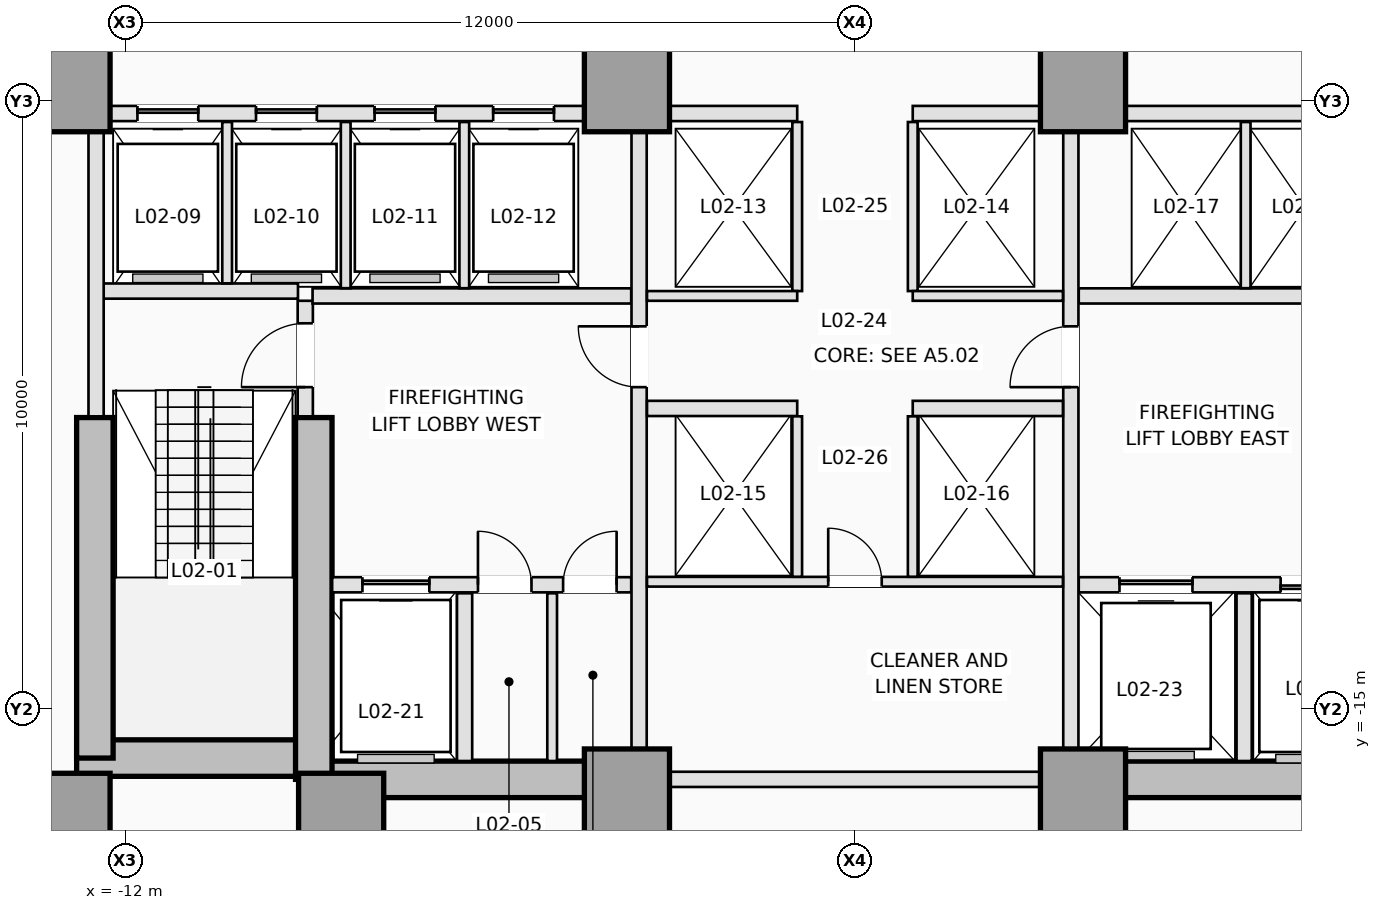
"""IFC4 building model, lengths in metres.
Left out: names, types, materials, properties, quantities, classifications, styles, units other than length and angle.
Written with IfcOpenShell. Run it as: python <this file> out.ifc"""

import sys

from ifc_helpers import new_model, si_unit, direction, frame, frame_2d, origin, origin_2d, place, context, subcontext, project, spatial, rectangle, extrude, element, fill, save


model = new_model("IFC4")
c1 = context("Model", 3, precision=1e-05, world=origin(), true_north=direction((0.0, 1.0)))
c2 = subcontext(c1, "Body", "Model", "MODEL_VIEW")
j1 = project(units=[si_unit("LENGTHUNIT", "METRE"), si_unit("PLANEANGLEUNIT", "RADIAN")], contexts=[c1])
p1 = place(None, origin())
s1 = spatial("IfcSite", under=j1, at=p1, CompositionType="ELEMENT")
p2 = place(p1, origin())
s2 = spatial("IfcBuilding", under=s1, at=p2, CompositionType="ELEMENT")
p3 = place(p2, frame((0.0, 0.0, 9.5)))
s3 = spatial("IfcBuildingStorey", under=s2, at=p3, CompositionType="ELEMENT", Elevation=9.5)
p4 = place(p3, frame((-12.8, -15.8, 0.0), z_axis=(0.0, 0.0, 1.0), x_axis=(1.0, 0.0, 0.0)))
e1 = element("IfcWall", 1, at=p4, inside=s3, PredefinedType="SHEAR", context=c2, shape_type="SweptSolid", body=[
    extrude(rectangle(XDim=4.2, YDim=0.6, at=frame_2d((2.1, 0.0))), origin(), (0.0, 0.0, 1.0), 4.5),
])
for number, where, z_axis, x_axis in (
    (2, (-8.9, -16.15, 0.0), (0.0, 0.0, 1.0), (1.0, 0.0, 0.0)),
    (3, (3.75, -16.15, 0.0), (0.0, 0.0, 1.0), (1.0, 0.0, 0.0)),
):
    element("IfcWall", number, at=place(p3, frame(where, z_axis=z_axis, x_axis=x_axis)), inside=s3, PredefinedType="SHEAR", context=c2, shape_type="SweptSolid", body=[
        extrude(rectangle(XDim=5.15, YDim=0.6, at=frame_2d((2.575, 0.0))), origin(), (0.0, 0.0, 1.0), 4.5),
    ])
p5 = place(p3, frame((-12.5, -15.8, 0.0), z_axis=(0.0, 0.0, 1.0), x_axis=(0.0, 1.0, 0.0)))
e4 = element("IfcWall", 4, at=p5, inside=s3, PredefinedType="SHEAR", context=c2, shape_type="SweptSolid", body=[
    extrude(rectangle(XDim=5.6, YDim=0.6, at=frame_2d((2.8, 0.0))), origin(), (0.0, 0.0, 1.0), 4.5),
])
p6 = place(p3, frame((-8.9, -16.15, 0.0), z_axis=(0.0, 0.0, 1.0), x_axis=(0.0, 1.0, 0.0)))
e5 = element("IfcWall", 5, at=p6, inside=s3, PredefinedType="SHEAR", context=c2, shape_type="SweptSolid", body=[
    extrude(rectangle(XDim=5.95, YDim=0.6, at=frame_2d((2.975, 0.0))), origin(), (0.0, 0.0, 1.0), 4.5),
])
for number, where, z_axis, x_axis in (
    (6, (-12.95, -16.75, 0.0), (0.0, 0.0, 1.0), (1.0, 0.0, 0.0)),
    (7, (-8.45, -16.75, 0.0), (0.0, 0.0, 1.0), (1.0, 0.0, 0.0)),
    (8, (-3.75, -16.35, 0.0), (0.0, 0.0, 1.0), (1.0, 0.0, 0.0)),
    (9, (3.75, -16.35, 0.0), (0.0, 0.0, 1.0), (1.0, 0.0, 0.0)),
    (10, (-12.95, -4.8, 0.0), (0.0, 0.0, 1.0), (1.0, 0.0, 0.0)),
    (11, (-3.75, -4.8, 0.0), (0.0, 0.0, 1.0), (1.0, 0.0, 0.0)),
    (12, (3.75, -4.8, 0.0), (0.0, 0.0, 1.0), (1.0, 0.0, 0.0)),
):
    element("IfcColumn", number, at=place(p3, frame(where, z_axis=z_axis, x_axis=x_axis)), inside=s3, PredefinedType="COLUMN", context=c2, shape_type="SweptSolid", body=[
        extrude(rectangle(XDim=1.4, YDim=1.4, at=origin_2d()), origin(), (0.0, 0.0, 1.0), 4.5),
    ])
p7 = place(p3, frame((-9.04, -10.18, 0.0), z_axis=(0.0, 0.0, 1.0), x_axis=(0.0, 1.0, 0.0)))
e13 = element("IfcWall", 13, at=p7, inside=s3, PredefinedType="PARTITIONING", context=c2, shape_type="SweptSolid", body=[
    extrude(rectangle(XDim=1.9, YDim=0.25, at=frame_2d((0.95, 0.0))), origin(), (0.0, 0.0, 1.0), 4.2),
])
p8 = place(p7, frame((0.48, 0.0, 0.0)))
e14 = element("IfcOpeningElement", 14, at=p8, cuts=e13, PredefinedType="OPENING", context=c2, shape_type="SweptSolid", body=[
    extrude(rectangle(XDim=1.05, YDim=2.15, at=frame_2d((0.525, 1.075))), frame((0.0, 0.135, 0.0), z_axis=(0.0, -1.0, 0.0), x_axis=(1.0, 0.0, 0.0)), (0.0, 0.0, 1.0), 0.27),
])
p9 = place(p3, frame((-12.38, -8.12, 0.0), z_axis=(0.0, 0.0, 1.0), x_axis=(1.0, 0.0, 0.0)))
e15 = element("IfcWall", 15, at=p9, inside=s3, PredefinedType="PARTITIONING", context=c2, shape_type="SweptSolid", body=[
    extrude(rectangle(XDim=3.22, YDim=0.25, at=frame_2d((1.61, 0.0))), origin(), (0.0, 0.0, 1.0), 4.2),
])
p10 = place(p3, frame((-12.48, -10.18, 0.0), z_axis=(0.0, 0.0, 1.0), x_axis=(0.0, 1.0, 0.0)))
e16 = element("IfcWall", 16, at=p10, inside=s3, PredefinedType="PARTITIONING", context=c2, shape_type="SweptSolid", body=[
    extrude(rectangle(XDim=4.678, YDim=0.25, at=frame_2d((2.339, 0.0))), origin(), (0.0, 0.0, 1.0), 4.2),
])
p11 = place(p3, frame((-8.598, -12.95, 0.0), z_axis=(0.0, 0.0, 1.0), x_axis=(1.0, 0.0, 0.0)))
e17 = element("IfcWall", 17, at=p11, inside=s3, PredefinedType="PARTITIONING", context=c2, shape_type="SweptSolid", body=[
    extrude(rectangle(XDim=4.918, YDim=0.25, at=frame_2d((2.459, 0.0))), origin(), (0.0, 0.0, 1.0), 4.2),
])
p12 = place(p11, frame((0.498, 0.0, 0.0)))
e18 = element("IfcOpeningElement", 18, at=p12, cuts=e17, PredefinedType="OPENING", context=c2, shape_type="SweptSolid", body=[
    extrude(rectangle(XDim=1.1, YDim=2.15, at=frame_2d((0.55, 1.075))), frame((0.0, 0.135, 0.0), z_axis=(0.0, -1.0, 0.0), x_axis=(1.0, 0.0, 0.0)), (0.0, 0.0, 1.0), 0.27),
])
p13 = place(p11, frame((2.398, 0.0, 0.0)))
e19 = element("IfcOpeningElement", 19, at=p13, cuts=e17, PredefinedType="OPENING", context=c2, shape_type="SweptSolid", body=[
    extrude(rectangle(XDim=0.88, YDim=2.1, at=frame_2d((0.44, 1.05))), frame((0.0, 0.135, 0.0), z_axis=(0.0, -1.0, 0.0), x_axis=(1.0, 0.0, 0.0)), (0.0, 0.0, 1.0), 0.27),
])
p14 = place(p11, frame((3.798, 0.0, 0.0)))
e20 = element("IfcOpeningElement", 20, at=p14, cuts=e17, PredefinedType="OPENING", context=c2, shape_type="SweptSolid", body=[
    extrude(rectangle(XDim=0.88, YDim=2.1, at=frame_2d((0.44, 1.05))), frame((0.0, 0.135, 0.0), z_axis=(0.0, -1.0, 0.0), x_axis=(1.0, 0.0, 0.0)), (0.0, 0.0, 1.0), 0.27),
])
p15 = place(p3, frame((3.68, -12.95, 0.0), z_axis=(0.0, 0.0, 1.0), x_axis=(1.0, 0.0, 0.0)))
e21 = element("IfcWall", 21, at=p15, inside=s3, PredefinedType="PARTITIONING", context=c2, shape_type="SweptSolid", body=[
    extrude(rectangle(XDim=4.918, YDim=0.25, at=frame_2d((2.459, 0.0))), origin(), (0.0, 0.0, 1.0), 4.2),
])
p16 = place(p15, frame((3.32, 0.0, 0.0)))
e22 = element("IfcOpeningElement", 22, at=p16, cuts=e21, PredefinedType="OPENING", context=c2, shape_type="SweptSolid", body=[
    extrude(rectangle(XDim=1.1, YDim=2.15, at=frame_2d((0.55, 1.075))), frame((0.0, 0.135, 0.0), z_axis=(0.0, -1.0, 0.0), x_axis=(1.0, 0.0, 0.0)), (0.0, 0.0, 1.0), 0.27),
])
p17 = place(p15, frame((0.67, 0.0, 0.0)))
e23 = element("IfcOpeningElement", 23, at=p17, cuts=e21, PredefinedType="OPENING", context=c2, shape_type="SweptSolid", body=[
    extrude(rectangle(XDim=1.2, YDim=2.15, at=frame_2d((0.6, 1.075))), frame((0.0, 0.135, 0.0), z_axis=(0.0, -1.0, 0.0), x_axis=(1.0, 0.0, 0.0)), (0.0, 0.0, 1.0), 0.27),
])
p18 = place(p3, frame((-6.42, -15.848, 0.0), z_axis=(0.0, 0.0, 1.0), x_axis=(0.0, 1.0, 0.0)))
e24 = element("IfcWall", 24, at=p18, inside=s3, PredefinedType="PARTITIONING", context=c2, shape_type="SweptSolid", body=[
    extrude(rectangle(XDim=2.758, YDim=0.25, at=frame_2d((1.379, 0.0))), origin(), (0.0, 0.0, 1.0), 4.2),
])
p19 = place(p3, frame((-4.98, -15.848, 0.0), z_axis=(0.0, 0.0, 1.0), x_axis=(0.0, 1.0, 0.0)))
e25 = element("IfcWall", 25, at=p19, inside=s3, PredefinedType="PARTITIONING", context=c2, shape_type="SweptSolid", body=[
    extrude(rectangle(XDim=2.758, YDim=0.16, at=frame_2d((1.379, 0.0))), origin(), (0.0, 0.0, 1.0), 4.2),
])
p20 = place(p3, frame((6.4, -15.848, 0.0), z_axis=(0.0, 0.0, 1.0), x_axis=(0.0, 1.0, 0.0)))
e26 = element("IfcWall", 26, at=p20, inside=s3, PredefinedType="PARTITIONING", context=c2, shape_type="SweptSolid", body=[
    extrude(rectangle(XDim=2.758, YDim=0.25, at=frame_2d((1.379, 0.0))), origin(), (0.0, 0.0, 1.0), 4.2),
])
for number, where, z_axis, x_axis in (
    (27, (-8.92, -8.2, 0.0), (0.0, 0.0, 1.0), (1.0, 0.0, 0.0)),
    (28, (3.68, -8.2, 0.0), (0.0, 0.0, 1.0), (1.0, 0.0, 0.0)),
):
    element("IfcWall", number, at=place(p3, frame(where, z_axis=z_axis, x_axis=x_axis)), inside=s3, PredefinedType="PARTITIONING", context=c2, shape_type="SweptSolid", body=[
        extrude(rectangle(XDim=5.24, YDim=0.25, at=frame_2d((2.62, 0.0))), origin(), (0.0, 0.0, 1.0), 4.2),
    ])
p21 = place(p3, frame((-3.55, -15.648, 0.0), z_axis=(0.0, 0.0, 1.0), x_axis=(0.0, 1.0, 0.0)))
e29 = element("IfcWall", 29, at=p21, inside=s3, PredefinedType="PARTITIONING", context=c2, shape_type="SweptSolid", body=[
    extrude(rectangle(XDim=10.146, YDim=0.25, at=frame_2d((5.073, 0.0))), origin(), (0.0, 0.0, 1.0), 4.2),
])
p22 = place(p21, frame((5.948, 0.0, 0.0)))
e30 = element("IfcOpeningElement", 30, at=p22, cuts=e29, PredefinedType="OPENING", context=c2, shape_type="SweptSolid", body=[
    extrude(rectangle(XDim=1.0, YDim=2.15, at=frame_2d((0.5, 1.075))), frame((0.0, 0.135, 0.0), z_axis=(0.0, -1.0, 0.0), x_axis=(1.0, 0.0, 0.0)), (0.0, 0.0, 1.0), 0.27),
])
p23 = place(p3, frame((3.55, -15.648, 0.0), z_axis=(0.0, 0.0, 1.0), x_axis=(0.0, 1.0, 0.0)))
e31 = element("IfcWall", 31, at=p23, inside=s3, PredefinedType="PARTITIONING", context=c2, shape_type="SweptSolid", body=[
    extrude(rectangle(XDim=10.146, YDim=0.25, at=frame_2d((5.073, 0.0))), origin(), (0.0, 0.0, 1.0), 4.2),
])
p24 = place(p23, frame((5.948, 0.0, 0.0)))
e32 = element("IfcOpeningElement", 32, at=p24, cuts=e31, PredefinedType="OPENING", context=c2, shape_type="SweptSolid", body=[
    extrude(rectangle(XDim=1.0, YDim=2.15, at=frame_2d((0.5, 1.075))), frame((0.0, 0.135, 0.0), z_axis=(0.0, -1.0, 0.0), x_axis=(1.0, 0.0, 0.0)), (0.0, 0.0, 1.0), 0.27),
])
p25 = place(p3, frame((-12.248, -5.2, 0.0), z_axis=(0.0, 0.0, 1.0), x_axis=(1.0, 0.0, 0.0)))
e33 = element("IfcWall", 33, at=p25, inside=s3, PredefinedType="PARTITIONING", context=c2, shape_type="SweptSolid", body=[
    extrude(rectangle(XDim=7.796, YDim=0.25, at=frame_2d((3.898, 0.0))), origin(), (0.0, 0.0, 1.0), 4.2),
])
p26 = place(p25, frame((0.448, 0.0, 0.0)))
e34 = element("IfcOpeningElement", 34, at=p26, cuts=e33, PredefinedType="OPENING", context=c2, shape_type="SweptSolid", body=[
    extrude(rectangle(XDim=1.0, YDim=2.15, at=frame_2d((0.5, 1.075))), frame((0.0, 0.135, 0.0), z_axis=(0.0, -1.0, 0.0), x_axis=(1.0, 0.0, 0.0)), (0.0, 0.0, 1.0), 0.27),
])
p27 = place(p25, frame((2.398, 0.0, 0.0)))
e35 = element("IfcOpeningElement", 35, at=p27, cuts=e33, PredefinedType="OPENING", context=c2, shape_type="SweptSolid", body=[
    extrude(rectangle(XDim=1.0, YDim=2.15, at=frame_2d((0.5, 1.075))), frame((0.0, 0.135, 0.0), z_axis=(0.0, -1.0, 0.0), x_axis=(1.0, 0.0, 0.0)), (0.0, 0.0, 1.0), 0.27),
])
p28 = place(p25, frame((4.348, 0.0, 0.0)))
e36 = element("IfcOpeningElement", 36, at=p28, cuts=e33, PredefinedType="OPENING", context=c2, shape_type="SweptSolid", body=[
    extrude(rectangle(XDim=1.0, YDim=2.15, at=frame_2d((0.5, 1.075))), frame((0.0, 0.135, 0.0), z_axis=(0.0, -1.0, 0.0), x_axis=(1.0, 0.0, 0.0)), (0.0, 0.0, 1.0), 0.27),
])
p29 = place(p25, frame((6.298, 0.0, 0.0)))
e37 = element("IfcOpeningElement", 37, at=p29, cuts=e33, PredefinedType="OPENING", context=c2, shape_type="SweptSolid", body=[
    extrude(rectangle(XDim=1.0, YDim=2.15, at=frame_2d((0.5, 1.075))), frame((0.0, 0.135, 0.0), z_axis=(0.0, -1.0, 0.0), x_axis=(1.0, 0.0, 0.0)), (0.0, 0.0, 1.0), 0.27),
])
p30 = place(p3, frame((4.452, -5.2, 0.0), z_axis=(0.0, 0.0, 1.0), x_axis=(1.0, 0.0, 0.0)))
e38 = element("IfcWall", 38, at=p30, inside=s3, PredefinedType="PARTITIONING", context=c2, shape_type="SweptSolid", body=[
    extrude(rectangle(XDim=7.796, YDim=0.25, at=frame_2d((3.898, 0.0))), origin(), (0.0, 0.0, 1.0), 4.2),
])
for number, where, z_axis, x_axis in (
    (39, (-3.048, -5.2, 0.0), (0.0, 0.0, 1.0), (1.0, 0.0, 0.0)),
    (40, (0.95, -5.2, 0.0), (0.0, 0.0, 1.0), (1.0, 0.0, 0.0)),
):
    element("IfcWall", number, at=place(p3, frame(where, z_axis=z_axis, x_axis=x_axis)), inside=s3, PredefinedType="PARTITIONING", context=c2, shape_type="SweptSolid", body=[
        extrude(rectangle(XDim=2.098, YDim=0.25, at=frame_2d((1.049, 0.0))), origin(), (0.0, 0.0, 1.0), 4.2),
    ])
p31 = place(p3, frame((-10.325, -7.993, 0.0), z_axis=(0.0, 0.0, 1.0), x_axis=(0.0, 1.0, 0.0)))
e41 = element("IfcWall", 41, at=p31, inside=s3, PredefinedType="PARTITIONING", context=c2, shape_type="SweptSolid", body=[
    extrude(rectangle(XDim=2.653, YDim=0.16, at=frame_2d((1.326, 0.0))), origin(), (0.0, 0.0, 1.0), 4.2),
])
for number, where, z_axis, x_axis in (
    (42, (-8.375, -8.073, 0.0), (0.0, 0.0, 1.0), (0.0, 1.0, 0.0)),
    (43, (-6.425, -8.073, 0.0), (0.0, 0.0, 1.0), (0.0, 1.0, 0.0)),
    (44, (6.425, -8.073, 0.0), (0.0, 0.0, 1.0), (0.0, 1.0, 0.0)),
):
    element("IfcWall", number, at=place(p3, frame(where, z_axis=z_axis, x_axis=x_axis)), inside=s3, PredefinedType="PARTITIONING", context=c2, shape_type="SweptSolid", body=[
        extrude(rectangle(XDim=2.733, YDim=0.16, at=frame_2d((1.366, 0.0))), origin(), (0.0, 0.0, 1.0), 4.2),
    ])
p32 = place(p3, frame((-3.048, -16.15, 0.0), z_axis=(0.0, 0.0, 1.0), x_axis=(1.0, 0.0, 0.0)))
e45 = element("IfcWall", 45, at=p32, inside=s3, PredefinedType="PARTITIONING", context=c2, shape_type="SweptSolid", body=[
    extrude(rectangle(XDim=6.096, YDim=0.25, at=frame_2d((3.048, 0.0))), origin(), (0.0, 0.0, 1.0), 3.176),
])
for number, where, z_axis, x_axis in (
    (46, (-0.95, -8.12, 0.0), (0.0, 0.0, 1.0), (0.0, 1.0, 0.0)),
    (47, (0.95, -8.12, 0.0), (0.0, 0.0, 1.0), (0.0, 1.0, 0.0)),
):
    element("IfcWall", number, at=place(p3, frame(where, z_axis=z_axis, x_axis=x_axis)), inside=s3, PredefinedType="PARTITIONING", context=c2, shape_type="SweptSolid", body=[
        extrude(rectangle(XDim=2.78, YDim=0.16, at=frame_2d((1.39, 0.0))), origin(), (0.0, 0.0, 1.0), 4.2),
    ])
for number, where, z_axis, x_axis in (
    (48, (-3.42, -8.2, 0.0), (0.0, 0.0, 1.0), (1.0, 0.0, 0.0)),
    (49, (0.95, -8.2, 0.0), (0.0, 0.0, 1.0), (1.0, 0.0, 0.0)),
):
    element("IfcWall", number, at=place(p3, frame(where, z_axis=z_axis, x_axis=x_axis)), inside=s3, PredefinedType="PARTITIONING", context=c2, shape_type="SweptSolid", body=[
        extrude(rectangle(XDim=2.47, YDim=0.16, at=frame_2d((1.235, 0.0))), origin(), (0.0, 0.0, 1.0), 4.2),
    ])
for number, where, z_axis, x_axis in (
    (50, (-3.42, -10.05, 0.0), (0.0, 0.0, 1.0), (1.0, 0.0, 0.0)),
    (51, (0.95, -10.05, 0.0), (0.0, 0.0, 1.0), (1.0, 0.0, 0.0)),
):
    element("IfcWall", number, at=place(p3, frame(where, z_axis=z_axis, x_axis=x_axis)), inside=s3, PredefinedType="PARTITIONING", context=c2, shape_type="SweptSolid", body=[
        extrude(rectangle(XDim=2.47, YDim=0.25, at=frame_2d((1.235, 0.0))), origin(), (0.0, 0.0, 1.0), 4.2),
    ])
p33 = place(p3, frame((-3.42, -12.9, 0.0), z_axis=(0.0, 0.0, 1.0), x_axis=(1.0, 0.0, 0.0)))
e52 = element("IfcWall", 52, at=p33, inside=s3, PredefinedType="PARTITIONING", context=c2, shape_type="SweptSolid", body=[
    extrude(rectangle(XDim=6.84, YDim=0.16, at=frame_2d((3.42, 0.0))), origin(), (0.0, 0.0, 1.0), 4.2),
])
p34 = place(p33, frame((2.98, 0.0, 0.0)))
e53 = element("IfcOpeningElement", 53, at=p34, cuts=e52, PredefinedType="OPENING", context=c2, shape_type="SweptSolid", body=[
    extrude(rectangle(XDim=0.88, YDim=2.12, at=frame_2d((0.44, 1.06))), frame((0.0, 0.09, 0.0), z_axis=(0.0, -1.0, 0.0), x_axis=(1.0, 0.0, 0.0)), (0.0, 0.0, 1.0), 0.18),
])
for number, where, z_axis, x_axis in (
    (54, (-0.95, -12.818, 0.0), (0.0, 0.0, 1.0), (0.0, 1.0, 0.0)),
    (55, (0.95, -12.818, 0.0), (0.0, 0.0, 1.0), (0.0, 1.0, 0.0)),
):
    element("IfcWall", number, at=place(p3, frame(where, z_axis=z_axis, x_axis=x_axis)), inside=s3, PredefinedType="PARTITIONING", context=c2, shape_type="SweptSolid", body=[
        extrude(rectangle(XDim=2.638, YDim=0.16, at=frame_2d((1.319, 0.0))), origin(), (0.0, 0.0, 1.0), 4.2),
    ])
p35 = place(p26, origin())
e56 = element("IfcDoor", 56, at=p35, inside=s3, OperationType="SLIDING_TO_LEFT", PredefinedType="DOOR", context=c2, shape_type="SweptSolid", body=[
    extrude(rectangle(XDim=1.0, YDim=2.15, at=frame_2d((0.5, 1.075))), frame((0.0, 0.025, 0.0), z_axis=(0.0, -1.0, 0.0), x_axis=(1.0, 0.0, 0.0)), (0.0, 0.0, 1.0), 0.05),
])
fill(e34, e56)
p36 = place(p27, origin())
e57 = element("IfcDoor", 57, at=p36, inside=s3, OperationType="SLIDING_TO_LEFT", PredefinedType="DOOR", context=c2, shape_type="SweptSolid", body=[
    extrude(rectangle(XDim=1.0, YDim=2.15, at=frame_2d((0.5, 1.075))), frame((0.0, 0.025, 0.0), z_axis=(0.0, -1.0, 0.0), x_axis=(1.0, 0.0, 0.0)), (0.0, 0.0, 1.0), 0.05),
])
fill(e35, e57)
p37 = place(p28, origin())
e58 = element("IfcDoor", 58, at=p37, inside=s3, OperationType="SLIDING_TO_LEFT", PredefinedType="DOOR", context=c2, shape_type="SweptSolid", body=[
    extrude(rectangle(XDim=1.0, YDim=2.15, at=frame_2d((0.5, 1.075))), frame((0.0, 0.025, 0.0), z_axis=(0.0, -1.0, 0.0), x_axis=(1.0, 0.0, 0.0)), (0.0, 0.0, 1.0), 0.05),
])
fill(e36, e58)
p38 = place(p29, origin())
e59 = element("IfcDoor", 59, at=p38, inside=s3, OperationType="SLIDING_TO_LEFT", PredefinedType="DOOR", context=c2, shape_type="SweptSolid", body=[
    extrude(rectangle(XDim=1.0, YDim=2.15, at=frame_2d((0.5, 1.075))), frame((0.0, 0.025, 0.0), z_axis=(0.0, -1.0, 0.0), x_axis=(1.0, 0.0, 0.0)), (0.0, 0.0, 1.0), 0.05),
])
fill(e37, e59)
p39 = place(p12, origin())
e60 = element("IfcDoor", 60, at=p39, inside=s3, OperationType="SLIDING_TO_LEFT", PredefinedType="DOOR", context=c2, shape_type="SweptSolid", body=[
    extrude(rectangle(XDim=1.1, YDim=2.15, at=frame_2d((0.55, 1.075))), frame((0.0, 0.025, 0.0), z_axis=(0.0, -1.0, 0.0), x_axis=(1.0, 0.0, 0.0)), (0.0, 0.0, 1.0), 0.05),
])
fill(e18, e60)
p40 = place(p16, origin())
e61 = element("IfcDoor", 61, at=p40, inside=s3, OperationType="SLIDING_TO_RIGHT", PredefinedType="DOOR", context=c2, shape_type="SweptSolid", body=[
    extrude(rectangle(XDim=1.1, YDim=2.15, at=frame_2d((0.55, 1.075))), frame((0.0, 0.025, 0.0), z_axis=(0.0, -1.0, 0.0), x_axis=(1.0, 0.0, 0.0)), (0.0, 0.0, 1.0), 0.05),
])
fill(e22, e61)
p41 = place(p17, origin())
e62 = element("IfcDoor", 62, at=p41, inside=s3, OperationType="SLIDING_TO_LEFT", PredefinedType="DOOR", context=c2, shape_type="SweptSolid", body=[
    extrude(rectangle(XDim=1.2, YDim=2.15, at=frame_2d((0.6, 1.075))), frame((0.0, 0.025, 0.0), z_axis=(0.0, -1.0, 0.0), x_axis=(1.0, 0.0, 0.0)), (0.0, 0.0, 1.0), 0.05),
])
fill(e23, e62)
p42 = place(p8, origin())
e63 = element("IfcDoor", 63, at=p42, inside=s3, OperationType="SINGLE_SWING_LEFT", PredefinedType="DOOR", context=c2, shape_type="SweptSolid", body=[
    extrude(rectangle(XDim=1.05, YDim=2.15, at=frame_2d((0.525, 1.075))), frame((0.0, 0.025, 0.0), z_axis=(0.0, -1.0, 0.0), x_axis=(1.0, 0.0, 0.0)), (0.0, 0.0, 1.0), 0.05),
])
fill(e14, e63)
p43 = place(p13, origin())
e64 = element("IfcDoor", 64, at=p43, inside=s3, OperationType="SINGLE_SWING_LEFT", PredefinedType="TRAPDOOR", context=c2, shape_type="SweptSolid", body=[
    extrude(rectangle(XDim=0.88, YDim=2.1, at=frame_2d((0.44, 1.05))), frame((0.0, 0.025, 0.0), z_axis=(0.0, -1.0, 0.0), x_axis=(1.0, 0.0, 0.0)), (0.0, 0.0, 1.0), 0.05),
])
fill(e19, e64)
p44 = place(p14, origin())
e65 = element("IfcDoor", 65, at=p44, inside=s3, OperationType="SINGLE_SWING_RIGHT", PredefinedType="TRAPDOOR", context=c2, shape_type="SweptSolid", body=[
    extrude(rectangle(XDim=0.88, YDim=2.1, at=frame_2d((0.44, 1.05))), frame((0.0, 0.025, 0.0), z_axis=(0.0, -1.0, 0.0), x_axis=(1.0, 0.0, 0.0)), (0.0, 0.0, 1.0), 0.05),
])
fill(e20, e65)
p45 = place(p22, origin())
e66 = element("IfcDoor", 66, at=p45, inside=s3, OperationType="SINGLE_SWING_RIGHT", PredefinedType="DOOR", context=c2, shape_type="SweptSolid", body=[
    extrude(rectangle(XDim=1.0, YDim=2.15, at=frame_2d((0.5, 1.075))), frame((0.0, 0.025, 0.0), z_axis=(0.0, -1.0, 0.0), x_axis=(1.0, 0.0, 0.0)), (0.0, 0.0, 1.0), 0.05),
])
fill(e30, e66)
p46 = place(p24, origin())
e67 = element("IfcDoor", 67, at=p46, inside=s3, OperationType="SINGLE_SWING_LEFT", PredefinedType="DOOR", context=c2, shape_type="SweptSolid", body=[
    extrude(rectangle(XDim=1.0, YDim=2.15, at=frame_2d((0.5, 1.075))), frame((0.0, 0.025, 0.0), z_axis=(0.0, -1.0, 0.0), x_axis=(1.0, 0.0, 0.0)), (0.0, 0.0, 1.0), 0.05),
])
fill(e32, e67)
p47 = place(p34, origin())
e68 = element("IfcDoor", 68, at=p47, inside=s3, OperationType="SINGLE_SWING_LEFT", PredefinedType="DOOR", context=c2, shape_type="SweptSolid", body=[
    extrude(rectangle(XDim=0.88, YDim=2.12, at=frame_2d((0.44, 1.06))), frame((0.0, 0.025, 0.0), z_axis=(0.0, -1.0, 0.0), x_axis=(1.0, 0.0, 0.0)), (0.0, 0.0, 1.0), 0.05),
])
fill(e53, e68)
save(model, sys.argv[1])
